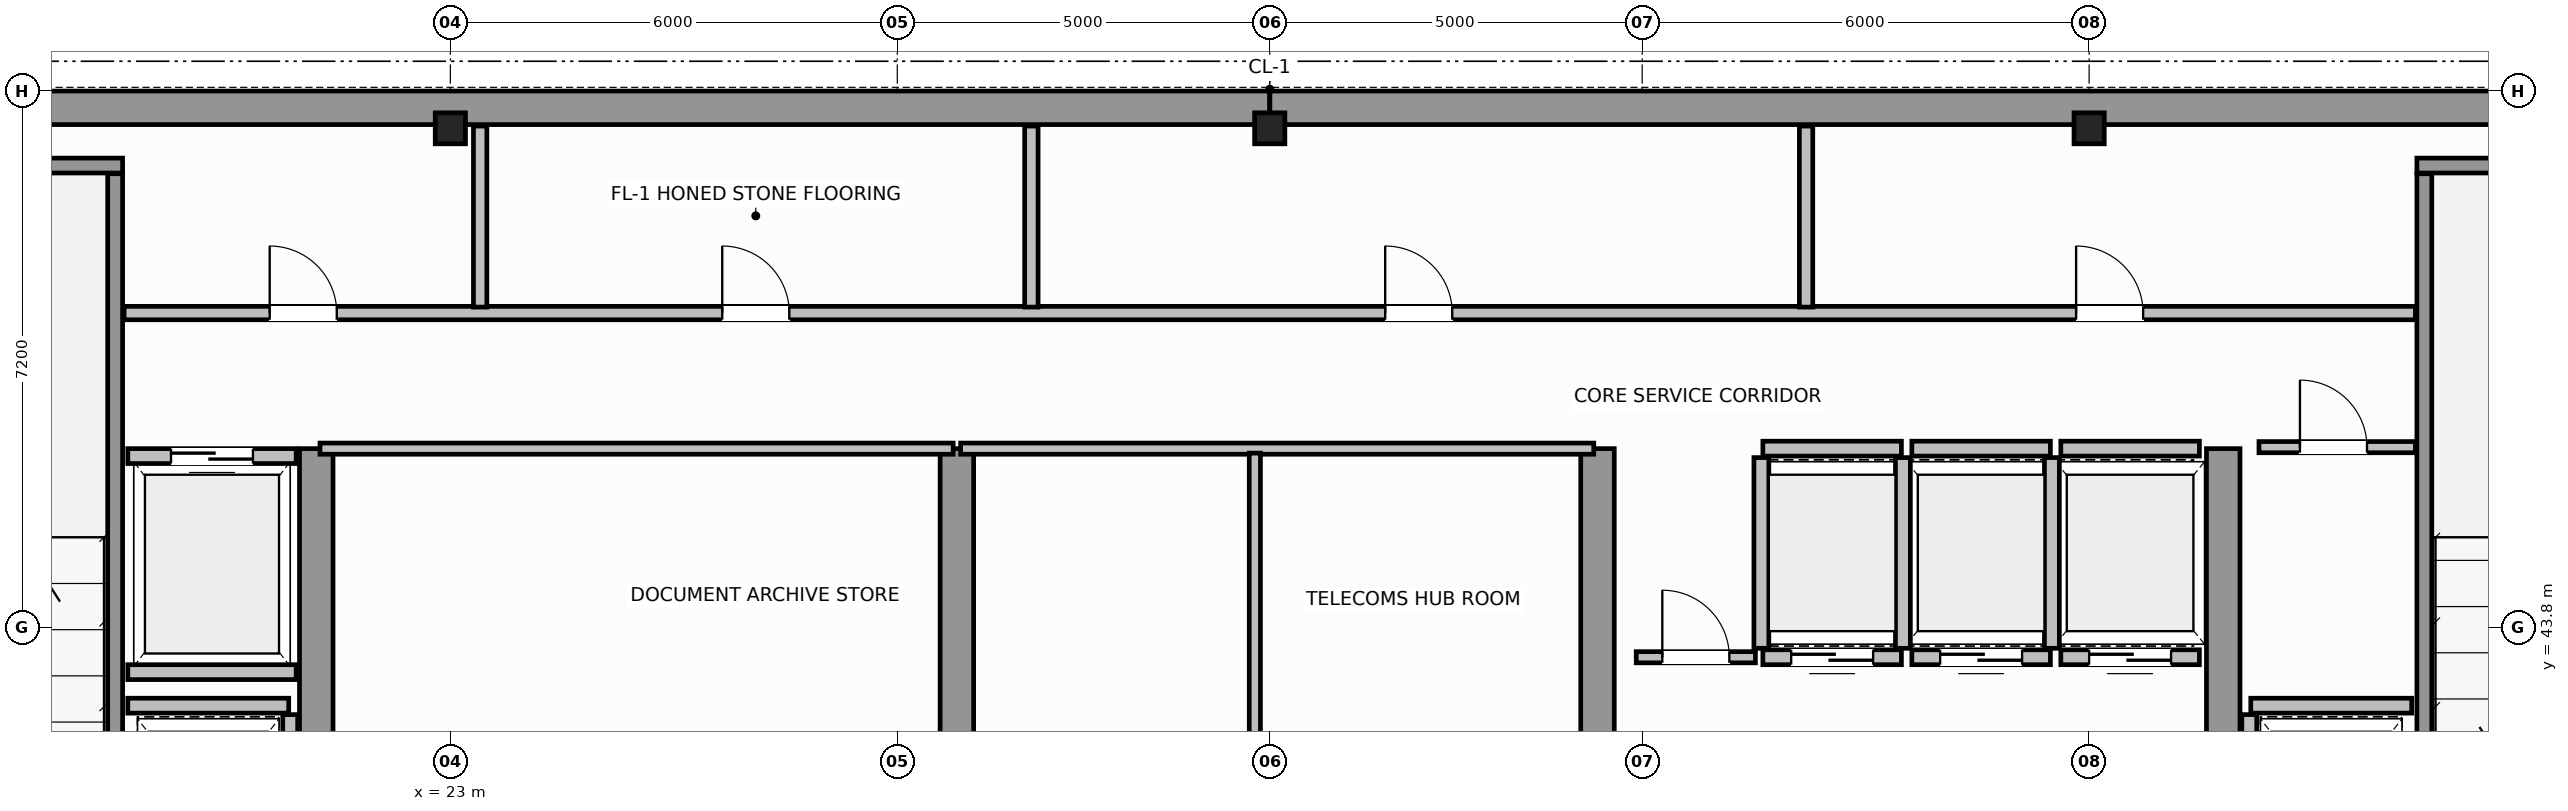
"""IFC4 building model, lengths in metres.
Left out: names, types, materials, properties, quantities, classifications, styles, units other than length and angle.
Written with IfcOpenShell. Run it as: python <this file> out.ifc"""

import sys

from ifc_helpers import new_model, si_unit, direction, frame, frame_2d, origin, origin_2d, place, context, subcontext, project, spatial, rectangle, i_section, extrude, source, transform, mapped, element, fill, save


model = new_model("IFC4")
c1 = context("Model", 3, precision=1e-05, world=origin(), true_north=direction((0.0, 1.0)))
c2 = subcontext(c1, "Body", "Model", "MODEL_VIEW")
j1 = project(units=[si_unit("LENGTHUNIT", "METRE"), si_unit("PLANEANGLEUNIT", "RADIAN")], contexts=[c1])
p1 = place(None, origin())
s1 = spatial("IfcSite", under=j1, at=p1, CompositionType="ELEMENT")
p2 = place(p1, origin())
s2 = spatial("IfcBuilding", under=s1, at=p2, CompositionType="ELEMENT")
p3 = place(p2, frame((0.0, 0.0, 284.0)))
s3 = spatial("IfcBuildingStorey", under=s2, at=p3, CompositionType="ELEMENT", Elevation=284.0)
m1 = source(origin(), c2, "Body", "SweptSolid", [
    extrude(i_section(OverallWidth=0.406, OverallDepth=0.416, WebThickness=0.03, FlangeThickness=0.042, FilletRadius=0.015, at=origin_2d()), origin(), (0.0, 0.0, 1.0), 3.8),
])
for number, where, z_axis, x_axis in (
    (1, (23.0, 50.5, 0.0), (0.0, 0.0, 1.0), (1.0, 0.0, 0.0)),
    (2, (34.0, 50.5, 0.0), (0.0, 0.0, 1.0), (1.0, 0.0, 0.0)),
    (3, (45.0, 50.5, 0.0), (0.0, 0.0, 1.0), (1.0, 0.0, 0.0)),
):
    element("IfcColumn", number, at=place(p3, frame(where, z_axis=z_axis, x_axis=x_axis)), inside=s3, PredefinedType="COLUMN", context=c2, shape_type="MappedRepresentation", body=[
        mapped(m1, transform((0.0, 0.0, 0.0), scale=1.0)),
    ])
for number, where, z_axis, x_axis in (
    (4, (14.229, 50.775, 0.0), (0.0, 0.0, 1.0), (1.0, 0.0, 0.0)),
    (5, (34.002, 50.775, 0.0), (0.0, 0.0, 1.0), (1.0, 0.0, 0.0)),
):
    element("IfcWall", number, at=place(p3, frame(where, z_axis=z_axis, x_axis=x_axis)), inside=s3, PredefinedType="SHEAR", context=c2, shape_type="SweptSolid", body=[
        extrude(rectangle(XDim=19.769, YDim=0.45, at=frame_2d((9.885, 0.0))), origin(), (0.0, 0.0, 1.0), 3.8),
    ])
for number, where, z_axis, x_axis in (
    (6, (21.2, 36.745, 0.0), (0.0, 0.0, 1.0), (0.0, 1.0, 0.0)),
    (7, (29.8, 36.745, 0.0), (0.0, 0.0, 1.0), (0.0, 1.0, 0.0)),
    (8, (38.4, 36.745, 0.0), (0.0, 0.0, 1.0), (0.0, 1.0, 0.0)),
    (9, (46.8, 36.745, 0.0), (0.0, 0.0, 1.0), (0.0, 1.0, 0.0)),
):
    element("IfcWall", number, at=place(p3, frame(where, z_axis=z_axis, x_axis=x_axis)), inside=s3, PredefinedType="SHEAR", context=c2, shape_type="SweptSolid", body=[
        extrude(rectangle(XDim=9.455, YDim=0.45, at=frame_2d((4.728, 0.0))), origin(), (0.0, 0.0, 1.0), 3.8),
    ])
p4 = place(p3, frame((14.225, 50.0, 0.0), z_axis=(0.0, 0.0, 1.0), x_axis=(1.0, 0.0, 0.0)))
e10 = element("IfcWall", 10, at=p4, inside=s3, PredefinedType="SOLIDWALL", context=c2, shape_type="SweptSolid", body=[
    extrude(rectangle(XDim=4.375, YDim=0.2, at=frame_2d((2.188, 0.0))), origin(), (0.0, 0.0, 1.0), 3.8),
])
p5 = place(p3, frame((18.5, 39.96, 0.0), z_axis=(0.0, 0.0, 1.0), x_axis=(0.0, 1.0, 0.0)))
e11 = element("IfcWall", 11, at=p5, inside=s3, PredefinedType="SOLIDWALL", context=c2, shape_type="SweptSolid", body=[
    extrude(rectangle(XDim=9.93, YDim=0.2, at=frame_2d((4.965, 0.0))), origin(), (0.0, 0.0, 1.0), 3.8),
])
p6 = place(p3, frame((49.4, 50.0, 0.0), z_axis=(0.0, 0.0, 1.0), x_axis=(1.0, 0.0, 0.0)))
e12 = element("IfcWall", 12, at=p6, inside=s3, PredefinedType="SOLIDWALL", context=c2, shape_type="SweptSolid", body=[
    extrude(rectangle(XDim=4.375, YDim=0.2, at=frame_2d((2.188, 0.0))), origin(), (0.0, 0.0, 1.0), 3.8),
])
p7 = place(p3, frame((49.5, 39.96, 0.0), z_axis=(0.0, 0.0, 1.0), x_axis=(0.0, 1.0, 0.0)))
e13 = element("IfcWall", 13, at=p7, inside=s3, PredefinedType="SOLIDWALL", context=c2, shape_type="SweptSolid", body=[
    extrude(rectangle(XDim=9.93, YDim=0.2, at=frame_2d((4.965, 0.0))), origin(), (0.0, 0.0, 1.0), 3.8),
])
p8 = place(p3, frame((40.62, 43.4, 0.0), z_axis=(0.0, 0.0, 1.0), x_axis=(1.0, 0.0, 0.0)))
e14 = element("IfcWall", 14, at=p8, inside=s3, PredefinedType="SOLIDWALL", context=c2, shape_type="SweptSolid", body=[
    extrude(rectangle(XDim=1.86, YDim=0.2, at=frame_2d((0.93, 0.0))), origin(), (0.0, 0.0, 1.0), 3.58),
])
p9 = place(p8, frame((0.38, 0.0, 0.0)))
e15 = element("IfcOpeningElement", 15, at=p9, cuts=e14, PredefinedType="OPENING", context=c2, shape_type="SweptSolid", body=[
    extrude(rectangle(XDim=1.1, YDim=2.15, at=frame_2d((0.55, 1.075))), frame((0.0, 0.11, 0.0), z_axis=(0.0, -1.0, 0.0), x_axis=(1.0, 0.0, 0.0)), (0.0, 0.0, 1.0), 0.22),
])
p10 = place(p3, frame((40.62, 46.2, 0.0), z_axis=(0.0, 0.0, 1.0), x_axis=(1.0, 0.0, 0.0)))
e16 = element("IfcWall", 16, at=p10, inside=s3, PredefinedType="SOLIDWALL", context=c2, shape_type="SweptSolid", body=[
    extrude(rectangle(XDim=1.86, YDim=0.2, at=frame_2d((0.93, 0.0))), origin(), (0.0, 0.0, 1.0), 3.58),
])
for number, where, z_axis, x_axis in (
    (17, (40.6, 43.52, 0.0), (0.0, 0.0, 1.0), (0.0, 1.0, 0.0)),
    (18, (42.5, 43.52, 0.0), (0.0, 0.0, 1.0), (0.0, 1.0, 0.0)),
):
    element("IfcWall", number, at=place(p3, frame(where, z_axis=z_axis, x_axis=x_axis)), inside=s3, PredefinedType="SOLIDWALL", context=c2, shape_type="SweptSolid", body=[
        extrude(rectangle(XDim=2.56, YDim=0.2, at=frame_2d((1.28, 0.0))), origin(), (0.0, 0.0, 1.0), 3.58),
    ])
p11 = place(p3, frame((42.62, 43.4, 0.0), z_axis=(0.0, 0.0, 1.0), x_axis=(1.0, 0.0, 0.0)))
e19 = element("IfcWall", 19, at=p11, inside=s3, PredefinedType="SOLIDWALL", context=c2, shape_type="SweptSolid", body=[
    extrude(rectangle(XDim=1.86, YDim=0.2, at=frame_2d((0.93, 0.0))), origin(), (0.0, 0.0, 1.0), 3.58),
])
p12 = place(p11, frame((0.38, 0.0, 0.0)))
e20 = element("IfcOpeningElement", 20, at=p12, cuts=e19, PredefinedType="OPENING", context=c2, shape_type="SweptSolid", body=[
    extrude(rectangle(XDim=1.1, YDim=2.15, at=frame_2d((0.55, 1.075))), frame((0.0, 0.11, 0.0), z_axis=(0.0, -1.0, 0.0), x_axis=(1.0, 0.0, 0.0)), (0.0, 0.0, 1.0), 0.22),
])
p13 = place(p3, frame((42.62, 46.2, 0.0), z_axis=(0.0, 0.0, 1.0), x_axis=(1.0, 0.0, 0.0)))
e21 = element("IfcWall", 21, at=p13, inside=s3, PredefinedType="SOLIDWALL", context=c2, shape_type="SweptSolid", body=[
    extrude(rectangle(XDim=1.86, YDim=0.2, at=frame_2d((0.93, 0.0))), origin(), (0.0, 0.0, 1.0), 3.58),
])
p14 = place(p3, frame((44.5, 43.52, 0.0), z_axis=(0.0, 0.0, 1.0), x_axis=(0.0, 1.0, 0.0)))
e22 = element("IfcWall", 22, at=p14, inside=s3, PredefinedType="SOLIDWALL", context=c2, shape_type="SweptSolid", body=[
    extrude(rectangle(XDim=2.56, YDim=0.2, at=frame_2d((1.28, 0.0))), origin(), (0.0, 0.0, 1.0), 3.58),
])
p15 = place(p3, frame((44.62, 43.4, 0.0), z_axis=(0.0, 0.0, 1.0), x_axis=(1.0, 0.0, 0.0)))
e23 = element("IfcWall", 23, at=p15, inside=s3, PredefinedType="SOLIDWALL", context=c2, shape_type="SweptSolid", body=[
    extrude(rectangle(XDim=1.86, YDim=0.2, at=frame_2d((0.93, 0.0))), origin(), (0.0, 0.0, 1.0), 3.58),
])
p16 = place(p15, frame((0.38, 0.0, 0.0)))
e24 = element("IfcOpeningElement", 24, at=p16, cuts=e23, PredefinedType="OPENING", context=c2, shape_type="SweptSolid", body=[
    extrude(rectangle(XDim=1.1, YDim=2.15, at=frame_2d((0.55, 1.075))), frame((0.0, 0.11, 0.0), z_axis=(0.0, -1.0, 0.0), x_axis=(1.0, 0.0, 0.0)), (0.0, 0.0, 1.0), 0.22),
])
p17 = place(p3, frame((44.62, 46.2, 0.0), z_axis=(0.0, 0.0, 1.0), x_axis=(1.0, 0.0, 0.0)))
e25 = element("IfcWall", 25, at=p17, inside=s3, PredefinedType="SOLIDWALL", context=c2, shape_type="SweptSolid", body=[
    extrude(rectangle(XDim=1.86, YDim=0.2, at=frame_2d((0.93, 0.0))), origin(), (0.0, 0.0, 1.0), 3.58),
])
p18 = place(p3, frame((18.67, 46.1, 0.0), z_axis=(0.0, 0.0, 1.0), x_axis=(1.0, 0.0, 0.0)))
e26 = element("IfcWall", 26, at=p18, inside=s3, PredefinedType="SOLIDWALL", context=c2, shape_type="SweptSolid", body=[
    extrude(rectangle(XDim=2.26, YDim=0.2, at=frame_2d((1.13, 0.0))), origin(), (0.0, 0.0, 1.0), 3.58),
])
p19 = place(p18, frame((0.58, 0.0, 0.0)))
e27 = element("IfcOpeningElement", 27, at=p19, cuts=e26, PredefinedType="OPENING", context=c2, shape_type="SweptSolid", body=[
    extrude(rectangle(XDim=1.1, YDim=2.15, at=frame_2d((0.55, 1.075))), frame((0.0, 0.11, 0.0), z_axis=(0.0, -1.0, 0.0), x_axis=(1.0, 0.0, 0.0)), (0.0, 0.0, 1.0), 0.22),
])
p20 = place(p3, frame((18.67, 43.2, 0.0), z_axis=(0.0, 0.0, 1.0), x_axis=(1.0, 0.0, 0.0)))
e28 = element("IfcWall", 28, at=p20, inside=s3, PredefinedType="SOLIDWALL", context=c2, shape_type="SweptSolid", body=[
    extrude(rectangle(XDim=2.26, YDim=0.2, at=frame_2d((1.13, 0.0))), origin(), (0.0, 0.0, 1.0), 3.58),
])
p21 = place(p3, frame((18.67, 42.75, 0.0), z_axis=(0.0, 0.0, 1.0), x_axis=(1.0, 0.0, 0.0)))
e29 = element("IfcWall", 29, at=p21, inside=s3, PredefinedType="SOLIDWALL", context=c2, shape_type="SweptSolid", body=[
    extrude(rectangle(XDim=2.16, YDim=0.2, at=frame_2d((1.08, 0.0))), origin(), (0.0, 0.0, 1.0), 3.58),
])
p22 = place(p3, frame((20.85, 40.07, 0.0), z_axis=(0.0, 0.0, 1.0), x_axis=(0.0, 1.0, 0.0)))
e30 = element("IfcWall", 30, at=p22, inside=s3, PredefinedType="SOLIDWALL", context=c2, shape_type="SweptSolid", body=[
    extrude(rectangle(XDim=2.56, YDim=0.2, at=frame_2d((1.28, 0.0))), origin(), (0.0, 0.0, 1.0), 3.58),
])
p23 = place(p3, frame((47.17, 42.75, 0.0), z_axis=(0.0, 0.0, 1.0), x_axis=(1.0, 0.0, 0.0)))
e31 = element("IfcWall", 31, at=p23, inside=s3, PredefinedType="SOLIDWALL", context=c2, shape_type="SweptSolid", body=[
    extrude(rectangle(XDim=2.16, YDim=0.2, at=frame_2d((1.08, 0.0))), origin(), (0.0, 0.0, 1.0), 3.58),
])
p24 = place(p3, frame((47.15, 40.07, 0.0), z_axis=(0.0, 0.0, 1.0), x_axis=(0.0, 1.0, 0.0)))
e32 = element("IfcWall", 32, at=p24, inside=s3, PredefinedType="SOLIDWALL", context=c2, shape_type="SweptSolid", body=[
    extrude(rectangle(XDim=2.56, YDim=0.2, at=frame_2d((1.28, 0.0))), origin(), (0.0, 0.0, 1.0), 3.58),
])
for number, where, z_axis, x_axis in (
    (33, (21.25, 46.2, 0.0), (0.0, 0.0, 1.0), (1.0, 0.0, 0.0)),
    (34, (29.85, 46.2, 0.0), (0.0, 0.0, 1.0), (1.0, 0.0, 0.0)),
):
    element("IfcWall", number, at=place(p3, frame(where, z_axis=z_axis, x_axis=x_axis)), inside=s3, PredefinedType="PARTITIONING", context=c2, shape_type="SweptSolid", body=[
        extrude(rectangle(XDim=8.5, YDim=0.15, at=frame_2d((4.25, 0.0))), origin(), (0.0, 0.0, 1.0), 3.58),
    ])
p25 = place(p3, frame((33.8, 36.56, 0.0), z_axis=(0.0, 0.0, 1.0), x_axis=(0.0, 1.0, 0.0)))
e35 = element("IfcWall", 35, at=p25, inside=s3, PredefinedType="PARTITIONING", context=c2, shape_type="SweptSolid", body=[
    extrude(rectangle(XDim=9.58, YDim=0.15, at=frame_2d((4.79, 0.0))), origin(), (0.0, 0.0, 1.0), 3.58),
])
p26 = place(p25, frame((4.2, 0.0, 0.0)))
e36 = element("IfcOpeningElement", 36, at=p26, cuts=e35, PredefinedType="OPENING", context=c2, shape_type="SweptSolid", body=[
    extrude(rectangle(XDim=0.9, YDim=2.1, at=frame_2d((0.45, 1.05))), frame((0.0, 0.085, 0.0), z_axis=(0.0, -1.0, 0.0), x_axis=(1.0, 0.0, 0.0)), (0.0, 0.0, 1.0), 0.17),
])
p27 = place(p3, frame((47.28, 46.22, 0.0), z_axis=(0.0, 0.0, 1.0), x_axis=(1.0, 0.0, 0.0)))
e37 = element("IfcWall", 37, at=p27, inside=s3, PredefinedType="PARTITIONING", context=c2, shape_type="SweptSolid", body=[
    extrude(rectangle(XDim=2.1, YDim=0.15, at=frame_2d((1.05, 0.0))), origin(), (0.0, 0.0, 1.0), 3.58),
])
p28 = place(p27, frame((0.55, 0.0, 0.0)))
e38 = element("IfcOpeningElement", 38, at=p28, cuts=e37, PredefinedType="OPENING", context=c2, shape_type="SweptSolid", body=[
    extrude(rectangle(XDim=0.9, YDim=2.1, at=frame_2d((0.45, 1.05))), frame((0.0, 0.085, 0.0), z_axis=(0.0, -1.0, 0.0), x_axis=(1.0, 0.0, 0.0)), (0.0, 0.0, 1.0), 0.17),
])
p29 = place(p3, frame((38.92, 43.4, 0.0), z_axis=(0.0, 0.0, 1.0), x_axis=(1.0, 0.0, 0.0)))
e39 = element("IfcWall", 39, at=p29, inside=s3, PredefinedType="PARTITIONING", context=c2, shape_type="SweptSolid", body=[
    extrude(rectangle(XDim=1.6, YDim=0.15, at=frame_2d((0.8, 0.0))), origin(), (0.0, 0.0, 1.0), 3.58),
])
p30 = place(p29, frame((0.35, 0.0, 0.0)))
e40 = element("IfcOpeningElement", 40, at=p30, cuts=e39, PredefinedType="OPENING", context=c2, shape_type="SweptSolid", body=[
    extrude(rectangle(XDim=0.9, YDim=2.1, at=frame_2d((0.45, 1.05))), frame((0.0, 0.085, 0.0), z_axis=(0.0, -1.0, 0.0), x_axis=(1.0, 0.0, 0.0)), (0.0, 0.0, 1.0), 0.17),
])
p31 = place(p3, frame((18.62, 48.02, 0.0), z_axis=(0.0, 0.0, 1.0), x_axis=(1.0, 0.0, 0.0)))
e41 = element("IfcWall", 41, at=p31, inside=s3, PredefinedType="PLUMBINGWALL", context=c2, shape_type="SweptSolid", body=[
    extrude(rectangle(XDim=30.76, YDim=0.18, at=frame_2d((15.38, 0.0))), origin(), (0.0, 0.0, 1.0), 3.58),
])
p32 = place(p31, frame((1.955, 0.0, 0.0)))
e42 = element("IfcOpeningElement", 42, at=p32, cuts=e41, PredefinedType="OPENING", context=c2, shape_type="SweptSolid", body=[
    extrude(rectangle(XDim=0.9, YDim=2.15, at=frame_2d((0.45, 1.075))), frame((0.0, 0.1, 0.0), z_axis=(0.0, -1.0, 0.0), x_axis=(1.0, 0.0, 0.0)), (0.0, 0.0, 1.0), 0.2),
])
p33 = place(p31, frame((8.03, 0.0, 0.0)))
e43 = element("IfcOpeningElement", 43, at=p33, cuts=e41, PredefinedType="OPENING", context=c2, shape_type="SweptSolid", body=[
    extrude(rectangle(XDim=0.9, YDim=2.15, at=frame_2d((0.45, 1.075))), frame((0.0, 0.1, 0.0), z_axis=(0.0, -1.0, 0.0), x_axis=(1.0, 0.0, 0.0)), (0.0, 0.0, 1.0), 0.2),
])
p34 = place(p31, frame((16.93, 0.0, 0.0)))
e44 = element("IfcOpeningElement", 44, at=p34, cuts=e41, PredefinedType="OPENING", context=c2, shape_type="SweptSolid", body=[
    extrude(rectangle(XDim=0.9, YDim=2.15, at=frame_2d((0.45, 1.075))), frame((0.0, 0.1, 0.0), z_axis=(0.0, -1.0, 0.0), x_axis=(1.0, 0.0, 0.0)), (0.0, 0.0, 1.0), 0.2),
])
p35 = place(p31, frame((26.205, 0.0, 0.0)))
e45 = element("IfcOpeningElement", 45, at=p35, cuts=e41, PredefinedType="OPENING", context=c2, shape_type="SweptSolid", body=[
    extrude(rectangle(XDim=0.9, YDim=2.15, at=frame_2d((0.45, 1.075))), frame((0.0, 0.1, 0.0), z_axis=(0.0, -1.0, 0.0), x_axis=(1.0, 0.0, 0.0)), (0.0, 0.0, 1.0), 0.2),
])
for number, where, z_axis, x_axis in (
    (46, (23.4, 48.1, 0.0), (0.0, 0.0, 1.0), (0.0, 1.0, 0.0)),
    (47, (30.8, 48.1, 0.0), (0.0, 0.0, 1.0), (0.0, 1.0, 0.0)),
    (48, (41.2, 48.1, 0.0), (0.0, 0.0, 1.0), (0.0, 1.0, 0.0)),
):
    element("IfcWall", number, at=place(p3, frame(where, z_axis=z_axis, x_axis=x_axis)), inside=s3, PredefinedType="PLUMBINGWALL", context=c2, shape_type="SweptSolid", body=[
        extrude(rectangle(XDim=2.43, YDim=0.18, at=frame_2d((1.215, 0.0))), origin(), (0.0, 0.0, 1.0), 3.58),
    ])
m2 = source(origin(), c2, "Body", "SweptSolid", [
    extrude(rectangle(XDim=1.1, YDim=2.15, at=frame_2d((0.55, 1.075))), frame((0.0, 0.025, 0.0), z_axis=(0.0, -1.0, 0.0), x_axis=(1.0, 0.0, 0.0)), (0.0, 0.0, 1.0), 0.05),
])
p36 = place(p9, origin())
e49 = element("IfcDoor", 49, at=p36, inside=s3, OperationType="DOUBLE_DOOR_SLIDING", PredefinedType="DOOR", context=c2, shape_type="MappedRepresentation", body=[
    mapped(m2, transform((0.0, 0.0, 0.0), scale=1.0)),
])
fill(e15, e49)
p37 = place(p12, origin())
e50 = element("IfcDoor", 50, at=p37, inside=s3, OperationType="DOUBLE_DOOR_SLIDING", PredefinedType="DOOR", context=c2, shape_type="MappedRepresentation", body=[
    mapped(m2, transform((0.0, 0.0, 0.0), scale=1.0)),
])
fill(e20, e50)
p38 = place(p16, origin())
e51 = element("IfcDoor", 51, at=p38, inside=s3, OperationType="DOUBLE_DOOR_SLIDING", PredefinedType="DOOR", context=c2, shape_type="MappedRepresentation", body=[
    mapped(m2, transform((0.0, 0.0, 0.0), scale=1.0)),
])
fill(e24, e51)
p39 = place(p19, origin())
e52 = element("IfcDoor", 52, at=p39, inside=s3, OperationType="DOUBLE_DOOR_SLIDING", PredefinedType="DOOR", context=c2, shape_type="MappedRepresentation", body=[
    mapped(m2, transform((0.0, 0.0, 0.0), scale=1.0)),
])
fill(e27, e52)
m3 = source(origin(), c2, "Body", "SweptSolid", [
    extrude(rectangle(XDim=0.9, YDim=2.1, at=frame_2d((0.45, 1.05))), frame((0.0, 0.025, 0.0), z_axis=(0.0, -1.0, 0.0), x_axis=(1.0, 0.0, 0.0)), (0.0, 0.0, 1.0), 0.05),
])
p40 = place(p28, origin())
e53 = element("IfcDoor", 53, at=p40, inside=s3, OperationType="SINGLE_SWING_RIGHT", PredefinedType="DOOR", context=c2, shape_type="MappedRepresentation", body=[
    mapped(m3, transform((0.0, 0.0, 0.0), scale=1.0)),
])
fill(e38, e53)
p41 = place(p30, origin())
e54 = element("IfcDoor", 54, at=p41, inside=s3, OperationType="SINGLE_SWING_LEFT", PredefinedType="DOOR", context=c2, shape_type="MappedRepresentation", body=[
    mapped(m3, transform((0.0, 0.0, 0.0), scale=1.0)),
])
fill(e40, e54)
m4 = source(origin(), c2, "Body", "SweptSolid", [
    extrude(rectangle(XDim=0.9, YDim=2.15, at=frame_2d((0.45, 1.075))), frame((0.0, 0.025, 0.0), z_axis=(0.0, -1.0, 0.0), x_axis=(1.0, 0.0, 0.0)), (0.0, 0.0, 1.0), 0.05),
])
p42 = place(p32, origin())
e55 = element("IfcDoor", 55, at=p42, inside=s3, OperationType="SINGLE_SWING_LEFT", PredefinedType="DOOR", context=c2, shape_type="MappedRepresentation", body=[
    mapped(m4, transform((0.0, 0.0, 0.0), scale=1.0)),
])
fill(e42, e55)
p43 = place(p33, origin())
e56 = element("IfcDoor", 56, at=p43, inside=s3, OperationType="SINGLE_SWING_RIGHT", PredefinedType="DOOR", context=c2, shape_type="MappedRepresentation", body=[
    mapped(m4, transform((0.0, 0.0, 0.0), scale=1.0)),
])
fill(e43, e56)
p44 = place(p34, origin())
e57 = element("IfcDoor", 57, at=p44, inside=s3, OperationType="SINGLE_SWING_LEFT", PredefinedType="DOOR", context=c2, shape_type="MappedRepresentation", body=[
    mapped(m4, transform((0.0, 0.0, 0.0), scale=1.0)),
])
fill(e44, e57)
p45 = place(p35, origin())
e58 = element("IfcDoor", 58, at=p45, inside=s3, OperationType="SINGLE_SWING_RIGHT", PredefinedType="DOOR", context=c2, shape_type="MappedRepresentation", body=[
    mapped(m4, transform((0.0, 0.0, 0.0), scale=1.0)),
])
fill(e45, e58)
save(model, sys.argv[1])
